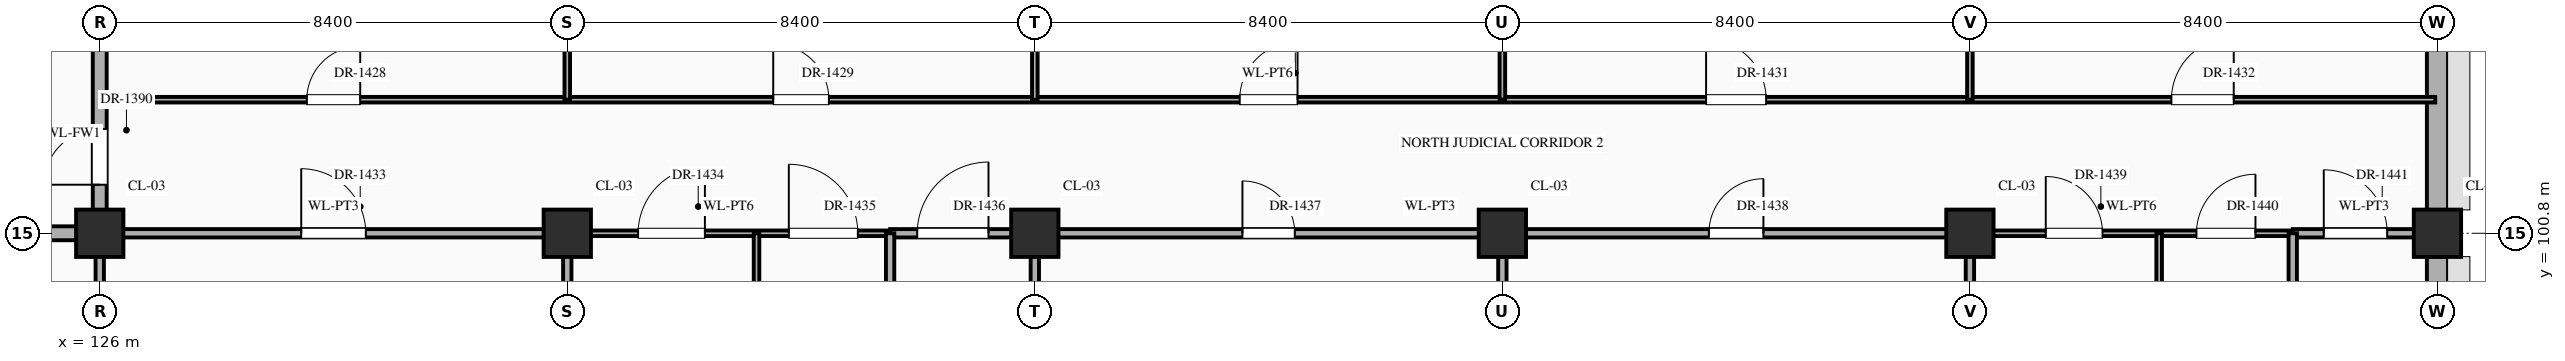
"""IFC4 building model, lengths in metres.
Left out: names, types, materials, properties, quantities, classifications, styles, units other than length and angle.
Written with IfcOpenShell. Run it as: python <this file> out.ifc"""

import sys

from ifc_helpers import new_model, si_unit, direction, frame, frame_2d, origin, origin_2d, place, context, subcontext, project, spatial, rectangle, extrude, element, fill, save


model = new_model("IFC4")
c1 = context("Model", 3, precision=1e-05, world=origin(), true_north=direction((0.0, 1.0)))
c2 = subcontext(c1, "Body", "Model", "MODEL_VIEW")
j1 = project(units=[si_unit("LENGTHUNIT", "METRE"), si_unit("PLANEANGLEUNIT", "RADIAN")], contexts=[c1])
p1 = place(None, origin())
s1 = spatial("IfcSite", under=j1, at=p1, CompositionType="ELEMENT")
p2 = place(p1, origin())
s2 = spatial("IfcBuilding", under=s1, at=p2, CompositionType="ELEMENT")
p3 = place(p2, frame((0.0, 0.0, 10.8)))
s3 = spatial("IfcBuildingStorey", under=s2, at=p3, CompositionType="ELEMENT", Elevation=10.8)
for number, where, z_axis, x_axis in (
    (1, (126.0, 100.8, 0.0), (0.0, 0.0, 1.0), (1.0, 0.0, 0.0)),
    (2, (134.4, 100.8, 0.0), (0.0, 0.0, 1.0), (1.0, 0.0, 0.0)),
    (3, (142.8, 100.8, 0.0), (0.0, 0.0, 1.0), (1.0, 0.0, 0.0)),
    (4, (151.2, 100.8, 0.0), (0.0, 0.0, 1.0), (1.0, 0.0, 0.0)),
    (5, (159.6, 100.8, 0.0), (0.0, 0.0, 1.0), (1.0, 0.0, 0.0)),
    (6, (168.0, 100.8, 0.0), (0.0, 0.0, 1.0), (1.0, 0.0, 0.0)),
):
    element("IfcColumn", number, at=place(p3, frame(where, z_axis=z_axis, x_axis=x_axis)), inside=s3, PredefinedType="COLUMN", context=c2, shape_type="SweptSolid", body=[
        extrude(rectangle(XDim=0.85, YDim=0.85, at=origin_2d()), origin(), (0.0, 0.0, 1.0), 5.4),
    ])
p4 = place(p3, frame((168.0, 94.02, 0.0), z_axis=(0.0, 0.0, 1.0), x_axis=(0.0, 1.0, 0.0)))
e7 = element("IfcWall", 7, at=p4, inside=s3, PredefinedType="STANDARD", context=c2, shape_type="SweptSolid", body=[
    extrude(rectangle(XDim=6.36, YDim=0.38, at=frame_2d((3.18, 0.0))), origin(), (0.0, 0.0, 1.0), 4.47),
])
p5 = place(p4, frame((3.805, 0.0, 0.85)))
e8 = element("IfcOpeningElement", 8, at=p5, cuts=e7, PredefinedType="OPENING", context=c2, shape_type="SweptSolid", body=[
    extrude(rectangle(XDim=1.35, YDim=1.2, at=frame_2d((0.675, 0.6))), frame((0.0, 0.202, 0.0), z_axis=(0.0, -1.0, 0.0), x_axis=(1.0, 0.0, 0.0)), (0.0, 0.0, 1.0), 0.404),
])
p6 = place(p3, frame((168.0, 101.22, 0.0), z_axis=(0.0, 0.0, 1.0), x_axis=(0.0, 1.0, 0.0)))
e9 = element("IfcWall", 9, at=p6, inside=s3, PredefinedType="STANDARD", context=c2, shape_type="SweptSolid", body=[
    extrude(rectangle(XDim=6.36, YDim=0.38, at=frame_2d((3.18, 0.0))), origin(), (0.0, 0.0, 1.0), 4.47),
])
p7 = place(p6, frame((3.805, 0.0, 0.85)))
e10 = element("IfcOpeningElement", 10, at=p7, cuts=e9, PredefinedType="OPENING", context=c2, shape_type="SweptSolid", body=[
    extrude(rectangle(XDim=1.35, YDim=1.38, at=frame_2d((0.675, 0.69))), frame((0.0, 0.202, 0.0), z_axis=(0.0, -1.0, 0.0), x_axis=(1.0, 0.0, 0.0)), (0.0, 0.0, 1.0), 0.404),
])
p8 = place(p3, frame((121.8, 100.8, 0.0), z_axis=(0.0, 0.0, 1.0), x_axis=(1.0, 0.0, 0.0)))
e11 = element("IfcWall", 11, at=p8, inside=s3, PredefinedType="STANDARD", context=c2, shape_type="SweptSolid", body=[
    extrude(rectangle(XDim=4.2, YDim=0.25, at=frame_2d((2.1, 0.0))), origin(), (0.0, 0.0, 1.0), 4.27),
])
p9 = place(p3, frame((126.0, 100.8, 0.0), z_axis=(0.0, 0.0, 1.0), x_axis=(1.0, 0.0, 0.0)))
e12 = element("IfcWall", 12, at=p9, inside=s3, PredefinedType="STANDARD", context=c2, shape_type="SweptSolid", body=[
    extrude(rectangle(XDim=8.4, YDim=0.15, at=frame_2d((4.2, 0.0))), origin(), (0.0, 0.0, 1.0), 4.27),
])
p10 = place(p9, frame((3.62, 0.0, 0.0)))
e13 = element("IfcOpeningElement", 13, at=p10, cuts=e12, PredefinedType="OPENING", context=c2, shape_type="SweptSolid", body=[
    extrude(rectangle(XDim=1.16, YDim=2.3, at=frame_2d((0.58, 1.15))), frame((0.0, 0.087, 0.0), z_axis=(0.0, -1.0, 0.0), x_axis=(1.0, 0.0, 0.0)), (0.0, 0.0, 1.0), 0.174),
])
p11 = place(p3, frame((134.4, 100.8, 0.0), z_axis=(0.0, 0.0, 1.0), x_axis=(1.0, 0.0, 0.0)))
e14 = element("IfcWall", 14, at=p11, inside=s3, PredefinedType="STANDARD", context=c2, shape_type="SweptSolid", body=[
    extrude(rectangle(XDim=5.8, YDim=0.1, at=frame_2d((2.9, 0.0))), origin(), (0.0, 0.0, 1.0), 4.27),
])
p12 = place(p11, frame((1.272, 0.0, 0.0)))
e15 = element("IfcOpeningElement", 15, at=p12, cuts=e14, PredefinedType="OPENING", context=c2, shape_type="SweptSolid", body=[
    extrude(rectangle(XDim=1.2, YDim=2.35, at=frame_2d((0.6, 1.175))), frame((0.0, 0.062, 0.0), z_axis=(0.0, -1.0, 0.0), x_axis=(1.0, 0.0, 0.0)), (0.0, 0.0, 1.0), 0.124),
])
p13 = place(p11, frame((3.98, 0.0, 0.0)))
e16 = element("IfcOpeningElement", 16, at=p13, cuts=e14, PredefinedType="OPENING", context=c2, shape_type="SweptSolid", body=[
    extrude(rectangle(XDim=1.24, YDim=2.3, at=frame_2d((0.62, 1.15))), frame((0.0, 0.062, 0.0), z_axis=(0.0, -1.0, 0.0), x_axis=(1.0, 0.0, 0.0)), (0.0, 0.0, 1.0), 0.124),
])
p14 = place(p3, frame((140.2, 100.8, 0.0), z_axis=(0.0, 0.0, 1.0), x_axis=(1.0, 0.0, 0.0)))
e17 = element("IfcWall", 17, at=p14, inside=s3, PredefinedType="STANDARD", context=c2, shape_type="SweptSolid", body=[
    extrude(rectangle(XDim=19.4, YDim=0.15, at=frame_2d((9.7, 0.0))), origin(), (0.0, 0.0, 1.0), 4.27),
])
p15 = place(p14, frame((0.488, 0.0, 0.0)))
e18 = element("IfcOpeningElement", 18, at=p15, cuts=e17, PredefinedType="OPENING", context=c2, shape_type="SweptSolid", body=[
    extrude(rectangle(XDim=1.28, YDim=2.35, at=frame_2d((0.64, 1.175))), frame((0.0, 0.087, 0.0), z_axis=(0.0, -1.0, 0.0), x_axis=(1.0, 0.0, 0.0)), (0.0, 0.0, 1.0), 0.174),
])
p16 = place(p14, frame((6.33, 0.0, 0.0)))
e19 = element("IfcOpeningElement", 19, at=p16, cuts=e17, PredefinedType="OPENING", context=c2, shape_type="SweptSolid", body=[
    extrude(rectangle(XDim=0.94, YDim=2.3, at=frame_2d((0.47, 1.15))), frame((0.0, 0.087, 0.0), z_axis=(0.0, -1.0, 0.0), x_axis=(1.0, 0.0, 0.0)), (0.0, 0.0, 1.0), 0.174),
])
p17 = place(p14, frame((14.71, 0.0, 0.0)))
e20 = element("IfcOpeningElement", 20, at=p17, cuts=e17, PredefinedType="OPENING", context=c2, shape_type="SweptSolid", body=[
    extrude(rectangle(XDim=0.98, YDim=2.35, at=frame_2d((0.49, 1.175))), frame((0.0, 0.087, 0.0), z_axis=(0.0, -1.0, 0.0), x_axis=(1.0, 0.0, 0.0)), (0.0, 0.0, 1.0), 0.174),
])
p18 = place(p3, frame((159.6, 100.8, 0.0), z_axis=(0.0, 0.0, 1.0), x_axis=(1.0, 0.0, 0.0)))
e21 = element("IfcWall", 21, at=p18, inside=s3, PredefinedType="STANDARD", context=c2, shape_type="SweptSolid", body=[
    extrude(rectangle(XDim=5.8, YDim=0.1, at=frame_2d((2.9, 0.0))), origin(), (0.0, 0.0, 1.0), 4.27),
])
p19 = place(p18, frame((1.363, 0.0, 0.0)))
e22 = element("IfcOpeningElement", 22, at=p19, cuts=e21, PredefinedType="OPENING", context=c2, shape_type="SweptSolid", body=[
    extrude(rectangle(XDim=1.02, YDim=2.4, at=frame_2d((0.51, 1.2))), frame((0.0, 0.062, 0.0), z_axis=(0.0, -1.0, 0.0), x_axis=(1.0, 0.0, 0.0)), (0.0, 0.0, 1.0), 0.124),
])
p20 = place(p18, frame((4.07, 0.0, 0.0)))
e23 = element("IfcOpeningElement", 23, at=p20, cuts=e21, PredefinedType="OPENING", context=c2, shape_type="SweptSolid", body=[
    extrude(rectangle(XDim=1.06, YDim=2.4, at=frame_2d((0.53, 1.2))), frame((0.0, 0.062, 0.0), z_axis=(0.0, -1.0, 0.0), x_axis=(1.0, 0.0, 0.0)), (0.0, 0.0, 1.0), 0.124),
])
p21 = place(p3, frame((165.4, 100.8, 0.0), z_axis=(0.0, 0.0, 1.0), x_axis=(1.0, 0.0, 0.0)))
e24 = element("IfcWall", 24, at=p21, inside=s3, PredefinedType="STANDARD", context=c2, shape_type="SweptSolid", body=[
    extrude(rectangle(XDim=2.56, YDim=0.15, at=frame_2d((1.28, 0.0))), origin(), (0.0, 0.0, 1.0), 4.27),
])
p22 = place(p21, frame((0.558, 0.0, 0.0)))
e25 = element("IfcOpeningElement", 25, at=p22, cuts=e24, PredefinedType="OPENING", context=c2, shape_type="SweptSolid", body=[
    extrude(rectangle(XDim=1.14, YDim=2.4, at=frame_2d((0.57, 1.2))), frame((0.0, 0.087, 0.0), z_axis=(0.0, -1.0, 0.0), x_axis=(1.0, 0.0, 0.0)), (0.0, 0.0, 1.0), 0.174),
])
p23 = place(p3, frame((126.0, 103.2, 0.0), z_axis=(0.0, 0.0, 1.0), x_axis=(1.0, 0.0, 0.0)))
e26 = element("IfcWall", 26, at=p23, inside=s3, PredefinedType="STANDARD", context=c2, shape_type="SweptSolid", body=[
    extrude(rectangle(XDim=41.96, YDim=0.1, at=frame_2d((20.98, 0.0))), origin(), (0.0, 0.0, 1.0), 5.12),
])
p24 = place(p23, frame((3.72, 0.0, 0.0)))
e27 = element("IfcOpeningElement", 27, at=p24, cuts=e26, PredefinedType="OPENING", context=c2, shape_type="SweptSolid", body=[
    extrude(rectangle(XDim=0.96, YDim=2.2, at=frame_2d((0.48, 1.1))), frame((0.0, 0.062, 0.0), z_axis=(0.0, -1.0, 0.0), x_axis=(1.0, 0.0, 0.0)), (0.0, 0.0, 1.0), 0.124),
])
p25 = place(p23, frame((12.1, 0.0, 0.0)))
e28 = element("IfcOpeningElement", 28, at=p25, cuts=e26, PredefinedType="OPENING", context=c2, shape_type="SweptSolid", body=[
    extrude(rectangle(XDim=1.0, YDim=2.25, at=frame_2d((0.5, 1.125))), frame((0.0, 0.062, 0.0), z_axis=(0.0, -1.0, 0.0), x_axis=(1.0, 0.0, 0.0)), (0.0, 0.0, 1.0), 0.124),
])
p26 = place(p23, frame((20.48, 0.0, 0.0)))
e29 = element("IfcOpeningElement", 29, at=p26, cuts=e26, PredefinedType="OPENING", context=c2, shape_type="SweptSolid", body=[
    extrude(rectangle(XDim=1.04, YDim=2.2, at=frame_2d((0.52, 1.1))), frame((0.0, 0.062, 0.0), z_axis=(0.0, -1.0, 0.0), x_axis=(1.0, 0.0, 0.0)), (0.0, 0.0, 1.0), 0.124),
])
p27 = place(p23, frame((28.86, 0.0, 0.0)))
e30 = element("IfcOpeningElement", 30, at=p27, cuts=e26, PredefinedType="OPENING", context=c2, shape_type="SweptSolid", body=[
    extrude(rectangle(XDim=1.08, YDim=2.25, at=frame_2d((0.54, 1.125))), frame((0.0, 0.062, 0.0), z_axis=(0.0, -1.0, 0.0), x_axis=(1.0, 0.0, 0.0)), (0.0, 0.0, 1.0), 0.124),
])
p28 = place(p23, frame((37.22, 0.0, 0.0)))
e31 = element("IfcOpeningElement", 31, at=p28, cuts=e26, PredefinedType="OPENING", context=c2, shape_type="SweptSolid", body=[
    extrude(rectangle(XDim=1.12, YDim=2.25, at=frame_2d((0.56, 1.125))), frame((0.0, 0.062, 0.0), z_axis=(0.0, -1.0, 0.0), x_axis=(1.0, 0.0, 0.0)), (0.0, 0.0, 1.0), 0.124),
])
p29 = place(p3, frame((126.0, 96.0, 0.0), z_axis=(0.0, 0.0, 1.0), x_axis=(0.0, 1.0, 0.0)))
e32 = element("IfcWall", 32, at=p29, inside=s3, PredefinedType="STANDARD", context=c2, shape_type="SweptSolid", body=[
    extrude(rectangle(XDim=4.8, YDim=0.15, at=frame_2d((2.4, 0.0))), origin(), (0.0, 0.0, 1.0), 4.37),
])
p30 = place(p3, frame((126.0, 100.8, 0.0), z_axis=(0.0, 0.0, 1.0), x_axis=(0.0, 1.0, 0.0)))
e33 = element("IfcWall", 33, at=p30, inside=s3, PredefinedType="STANDARD", context=c2, shape_type="SweptSolid", body=[
    extrude(rectangle(XDim=3.6, YDim=0.25, at=frame_2d((1.8, 0.0))), origin(), (0.0, 0.0, 1.0), 4.37),
])
p31 = place(p30, frame((0.873, 0.0, 0.0)))
e34 = element("IfcOpeningElement", 34, at=p31, cuts=e33, PredefinedType="OPENING", context=c2, shape_type="SweptSolid", body=[
    extrude(rectangle(XDim=1.0, YDim=2.2, at=frame_2d((0.5, 1.1))), frame((0.0, 0.137, 0.0), z_axis=(0.0, -1.0, 0.0), x_axis=(1.0, 0.0, 0.0)), (0.0, 0.0, 1.0), 0.274),
])
p32 = place(p3, frame((134.4, 96.0, 0.0), z_axis=(0.0, 0.0, 1.0), x_axis=(0.0, 1.0, 0.0)))
e35 = element("IfcWall", 35, at=p32, inside=s3, PredefinedType="STANDARD", context=c2, shape_type="SweptSolid", body=[
    extrude(rectangle(XDim=4.8, YDim=0.15, at=frame_2d((2.4, 0.0))), origin(), (0.0, 0.0, 1.0), 4.37),
])
p33 = place(p3, frame((134.4, 103.2, 0.0), z_axis=(0.0, 0.0, 1.0), x_axis=(0.0, 1.0, 0.0)))
e36 = element("IfcWall", 36, at=p33, inside=s3, PredefinedType="STANDARD", context=c2, shape_type="SweptSolid", body=[
    extrude(rectangle(XDim=4.76, YDim=0.1, at=frame_2d((2.38, 0.0))), origin(), (0.0, 0.0, 1.0), 4.37),
])
p34 = place(p3, frame((137.8, 96.0, 0.0), z_axis=(0.0, 0.0, 1.0), x_axis=(0.0, 1.0, 0.0)))
e37 = element("IfcWall", 37, at=p34, inside=s3, PredefinedType="STANDARD", context=c2, shape_type="SweptSolid", body=[
    extrude(rectangle(XDim=4.8, YDim=0.1, at=frame_2d((2.4, 0.0))), origin(), (0.0, 0.0, 1.0), 5.12),
])
p35 = place(p34, frame((1.8, 0.0, 0.0)))
e38 = element("IfcOpeningElement", 38, at=p35, cuts=e37, PredefinedType="OPENING", context=c2, shape_type="SweptSolid", body=[
    extrude(rectangle(XDim=1.2, YDim=2.35, at=frame_2d((0.6, 1.175))), frame((0.0, 0.062, 0.0), z_axis=(0.0, -1.0, 0.0), x_axis=(1.0, 0.0, 0.0)), (0.0, 0.0, 1.0), 0.124),
])
p36 = place(p3, frame((140.2, 96.0, 0.0), z_axis=(0.0, 0.0, 1.0), x_axis=(0.0, 1.0, 0.0)))
e39 = element("IfcWall", 39, at=p36, inside=s3, PredefinedType="STANDARD", context=c2, shape_type="SweptSolid", body=[
    extrude(rectangle(XDim=4.8, YDim=0.15, at=frame_2d((2.4, 0.0))), origin(), (0.0, 0.0, 1.0), 5.12),
])
p37 = place(p36, frame((1.78, 0.0, 0.0)))
e40 = element("IfcOpeningElement", 40, at=p37, cuts=e39, PredefinedType="OPENING", context=c2, shape_type="SweptSolid", body=[
    extrude(rectangle(XDim=1.24, YDim=2.3, at=frame_2d((0.62, 1.15))), frame((0.0, 0.087, 0.0), z_axis=(0.0, -1.0, 0.0), x_axis=(1.0, 0.0, 0.0)), (0.0, 0.0, 1.0), 0.174),
])
p38 = place(p3, frame((142.8, 96.0, 0.0), z_axis=(0.0, 0.0, 1.0), x_axis=(0.0, 1.0, 0.0)))
e41 = element("IfcWall", 41, at=p38, inside=s3, PredefinedType="STANDARD", context=c2, shape_type="SweptSolid", body=[
    extrude(rectangle(XDim=4.8, YDim=0.15, at=frame_2d((2.4, 0.0))), origin(), (0.0, 0.0, 1.0), 4.37),
])
p39 = place(p3, frame((142.8, 103.2, 0.0), z_axis=(0.0, 0.0, 1.0), x_axis=(0.0, 1.0, 0.0)))
e42 = element("IfcWall", 42, at=p39, inside=s3, PredefinedType="STANDARD", context=c2, shape_type="SweptSolid", body=[
    extrude(rectangle(XDim=4.76, YDim=0.1, at=frame_2d((2.38, 0.0))), origin(), (0.0, 0.0, 1.0), 4.37),
])
p40 = place(p3, frame((151.2, 96.0, 0.0), z_axis=(0.0, 0.0, 1.0), x_axis=(0.0, 1.0, 0.0)))
e43 = element("IfcWall", 43, at=p40, inside=s3, PredefinedType="STANDARD", context=c2, shape_type="SweptSolid", body=[
    extrude(rectangle(XDim=4.8, YDim=0.15, at=frame_2d((2.4, 0.0))), origin(), (0.0, 0.0, 1.0), 4.37),
])
p41 = place(p3, frame((151.2, 103.2, 0.0), z_axis=(0.0, 0.0, 1.0), x_axis=(0.0, 1.0, 0.0)))
e44 = element("IfcWall", 44, at=p41, inside=s3, PredefinedType="STANDARD", context=c2, shape_type="SweptSolid", body=[
    extrude(rectangle(XDim=4.76, YDim=0.1, at=frame_2d((2.38, 0.0))), origin(), (0.0, 0.0, 1.0), 4.37),
])
p42 = place(p3, frame((159.6, 96.0, 0.0), z_axis=(0.0, 0.0, 1.0), x_axis=(0.0, 1.0, 0.0)))
e45 = element("IfcWall", 45, at=p42, inside=s3, PredefinedType="STANDARD", context=c2, shape_type="SweptSolid", body=[
    extrude(rectangle(XDim=4.8, YDim=0.15, at=frame_2d((2.4, 0.0))), origin(), (0.0, 0.0, 1.0), 4.37),
])
p43 = place(p3, frame((159.6, 103.2, 0.0), z_axis=(0.0, 0.0, 1.0), x_axis=(0.0, 1.0, 0.0)))
e46 = element("IfcWall", 46, at=p43, inside=s3, PredefinedType="STANDARD", context=c2, shape_type="SweptSolid", body=[
    extrude(rectangle(XDim=4.76, YDim=0.1, at=frame_2d((2.38, 0.0))), origin(), (0.0, 0.0, 1.0), 4.37),
])
p44 = place(p3, frame((163.0, 96.0, 0.0), z_axis=(0.0, 0.0, 1.0), x_axis=(0.0, 1.0, 0.0)))
e47 = element("IfcWall", 47, at=p44, inside=s3, PredefinedType="STANDARD", context=c2, shape_type="SweptSolid", body=[
    extrude(rectangle(XDim=4.8, YDim=0.1, at=frame_2d((2.4, 0.0))), origin(), (0.0, 0.0, 1.0), 5.12),
])
p45 = place(p44, frame((1.76, 0.0, 0.0)))
e48 = element("IfcOpeningElement", 48, at=p45, cuts=e47, PredefinedType="OPENING", context=c2, shape_type="SweptSolid", body=[
    extrude(rectangle(XDim=1.28, YDim=2.35, at=frame_2d((0.64, 1.175))), frame((0.0, 0.062, 0.0), z_axis=(0.0, -1.0, 0.0), x_axis=(1.0, 0.0, 0.0)), (0.0, 0.0, 1.0), 0.124),
])
p46 = place(p3, frame((165.4, 96.0, 0.0), z_axis=(0.0, 0.0, 1.0), x_axis=(0.0, 1.0, 0.0)))
e49 = element("IfcWall", 49, at=p46, inside=s3, PredefinedType="STANDARD", context=c2, shape_type="SweptSolid", body=[
    extrude(rectangle(XDim=4.8, YDim=0.15, at=frame_2d((2.4, 0.0))), origin(), (0.0, 0.0, 1.0), 5.12),
])
p47 = place(p46, frame((1.93, 0.0, 0.0)))
e50 = element("IfcOpeningElement", 50, at=p47, cuts=e49, PredefinedType="OPENING", context=c2, shape_type="SweptSolid", body=[
    extrude(rectangle(XDim=0.94, YDim=2.3, at=frame_2d((0.47, 1.15))), frame((0.0, 0.087, 0.0), z_axis=(0.0, -1.0, 0.0), x_axis=(1.0, 0.0, 0.0)), (0.0, 0.0, 1.0), 0.174),
])
p48 = place(p31, origin())
e51 = element("IfcDoor", 51, at=p48, inside=s3, OperationType="SINGLE_SWING_LEFT", PredefinedType="DOOR", context=c2, shape_type="SweptSolid", body=[
    extrude(rectangle(XDim=1.0, YDim=2.2, at=frame_2d((0.5, 1.1))), frame((0.0, 0.025, 0.0), z_axis=(0.0, -1.0, 0.0), x_axis=(1.0, 0.0, 0.0)), (0.0, 0.0, 1.0), 0.05),
])
fill(e34, e51)
p49 = place(p24, origin())
e52 = element("IfcDoor", 52, at=p49, inside=s3, OperationType="SINGLE_SWING_RIGHT", PredefinedType="DOOR", context=c2, shape_type="SweptSolid", body=[
    extrude(rectangle(XDim=0.96, YDim=2.2, at=frame_2d((0.48, 1.1))), frame((0.0, 0.025, 0.0), z_axis=(0.0, -1.0, 0.0), x_axis=(1.0, 0.0, 0.0)), (0.0, 0.0, 1.0), 0.05),
])
fill(e27, e52)
p50 = place(p25, origin())
e53 = element("IfcDoor", 53, at=p50, inside=s3, OperationType="SINGLE_SWING_LEFT", PredefinedType="DOOR", context=c2, shape_type="SweptSolid", body=[
    extrude(rectangle(XDim=1.0, YDim=2.25, at=frame_2d((0.5, 1.125))), frame((0.0, 0.025, 0.0), z_axis=(0.0, -1.0, 0.0), x_axis=(1.0, 0.0, 0.0)), (0.0, 0.0, 1.0), 0.05),
])
fill(e28, e53)
p51 = place(p26, origin())
e54 = element("IfcDoor", 54, at=p51, inside=s3, OperationType="SINGLE_SWING_RIGHT", PredefinedType="DOOR", context=c2, shape_type="SweptSolid", body=[
    extrude(rectangle(XDim=1.04, YDim=2.2, at=frame_2d((0.52, 1.1))), frame((0.0, 0.025, 0.0), z_axis=(0.0, -1.0, 0.0), x_axis=(1.0, 0.0, 0.0)), (0.0, 0.0, 1.0), 0.05),
])
fill(e29, e54)
p52 = place(p27, origin())
e55 = element("IfcDoor", 55, at=p52, inside=s3, OperationType="SINGLE_SWING_LEFT", PredefinedType="DOOR", context=c2, shape_type="SweptSolid", body=[
    extrude(rectangle(XDim=1.08, YDim=2.25, at=frame_2d((0.54, 1.125))), frame((0.0, 0.025, 0.0), z_axis=(0.0, -1.0, 0.0), x_axis=(1.0, 0.0, 0.0)), (0.0, 0.0, 1.0), 0.05),
])
fill(e30, e55)
p53 = place(p28, origin())
e56 = element("IfcDoor", 56, at=p53, inside=s3, OperationType="SINGLE_SWING_RIGHT", PredefinedType="DOOR", context=c2, shape_type="SweptSolid", body=[
    extrude(rectangle(XDim=1.12, YDim=2.25, at=frame_2d((0.56, 1.125))), frame((0.0, 0.025, 0.0), z_axis=(0.0, -1.0, 0.0), x_axis=(1.0, 0.0, 0.0)), (0.0, 0.0, 1.0), 0.05),
])
fill(e31, e56)
p54 = place(p10, origin())
e57 = element("IfcDoor", 57, at=p54, inside=s3, OperationType="SINGLE_SWING_LEFT", PredefinedType="DOOR", context=c2, shape_type="SweptSolid", body=[
    extrude(rectangle(XDim=1.16, YDim=2.3, at=frame_2d((0.58, 1.15))), frame((0.0, 0.025, 0.0), z_axis=(0.0, -1.0, 0.0), x_axis=(1.0, 0.0, 0.0)), (0.0, 0.0, 1.0), 0.05),
])
fill(e13, e57)
p55 = place(p12, origin())
e58 = element("IfcDoor", 58, at=p55, inside=s3, OperationType="SINGLE_SWING_RIGHT", PredefinedType="DOOR", context=c2, shape_type="SweptSolid", body=[
    extrude(rectangle(XDim=1.2, YDim=2.35, at=frame_2d((0.6, 1.175))), frame((0.0, 0.025, 0.0), z_axis=(0.0, -1.0, 0.0), x_axis=(1.0, 0.0, 0.0)), (0.0, 0.0, 1.0), 0.05),
])
fill(e15, e58)
p56 = place(p13, origin())
e59 = element("IfcDoor", 59, at=p56, inside=s3, OperationType="SINGLE_SWING_LEFT", PredefinedType="DOOR", context=c2, shape_type="SweptSolid", body=[
    extrude(rectangle(XDim=1.24, YDim=2.3, at=frame_2d((0.62, 1.15))), frame((0.0, 0.025, 0.0), z_axis=(0.0, -1.0, 0.0), x_axis=(1.0, 0.0, 0.0)), (0.0, 0.0, 1.0), 0.05),
])
fill(e16, e59)
p57 = place(p15, origin())
e60 = element("IfcDoor", 60, at=p57, inside=s3, OperationType="SINGLE_SWING_RIGHT", PredefinedType="DOOR", context=c2, shape_type="SweptSolid", body=[
    extrude(rectangle(XDim=1.28, YDim=2.35, at=frame_2d((0.64, 1.175))), frame((0.0, 0.025, 0.0), z_axis=(0.0, -1.0, 0.0), x_axis=(1.0, 0.0, 0.0)), (0.0, 0.0, 1.0), 0.05),
])
fill(e18, e60)
p58 = place(p16, origin())
e61 = element("IfcDoor", 61, at=p58, inside=s3, OperationType="SINGLE_SWING_LEFT", PredefinedType="DOOR", context=c2, shape_type="SweptSolid", body=[
    extrude(rectangle(XDim=0.94, YDim=2.3, at=frame_2d((0.47, 1.15))), frame((0.0, 0.025, 0.0), z_axis=(0.0, -1.0, 0.0), x_axis=(1.0, 0.0, 0.0)), (0.0, 0.0, 1.0), 0.05),
])
fill(e19, e61)
p59 = place(p17, origin())
e62 = element("IfcDoor", 62, at=p59, inside=s3, OperationType="SINGLE_SWING_RIGHT", PredefinedType="DOOR", context=c2, shape_type="SweptSolid", body=[
    extrude(rectangle(XDim=0.98, YDim=2.35, at=frame_2d((0.49, 1.175))), frame((0.0, 0.025, 0.0), z_axis=(0.0, -1.0, 0.0), x_axis=(1.0, 0.0, 0.0)), (0.0, 0.0, 1.0), 0.05),
])
fill(e20, e62)
p60 = place(p19, origin())
e63 = element("IfcDoor", 63, at=p60, inside=s3, OperationType="SINGLE_SWING_LEFT", PredefinedType="DOOR", context=c2, shape_type="SweptSolid", body=[
    extrude(rectangle(XDim=1.02, YDim=2.4, at=frame_2d((0.51, 1.2))), frame((0.0, 0.025, 0.0), z_axis=(0.0, -1.0, 0.0), x_axis=(1.0, 0.0, 0.0)), (0.0, 0.0, 1.0), 0.05),
])
fill(e22, e63)
p61 = place(p20, origin())
e64 = element("IfcDoor", 64, at=p61, inside=s3, OperationType="SINGLE_SWING_RIGHT", PredefinedType="DOOR", context=c2, shape_type="SweptSolid", body=[
    extrude(rectangle(XDim=1.06, YDim=2.4, at=frame_2d((0.53, 1.2))), frame((0.0, 0.025, 0.0), z_axis=(0.0, -1.0, 0.0), x_axis=(1.0, 0.0, 0.0)), (0.0, 0.0, 1.0), 0.05),
])
fill(e23, e64)
p62 = place(p22, origin())
e65 = element("IfcDoor", 65, at=p62, inside=s3, OperationType="SINGLE_SWING_LEFT", PredefinedType="DOOR", context=c2, shape_type="SweptSolid", body=[
    extrude(rectangle(XDim=1.14, YDim=2.4, at=frame_2d((0.57, 1.2))), frame((0.0, 0.025, 0.0), z_axis=(0.0, -1.0, 0.0), x_axis=(1.0, 0.0, 0.0)), (0.0, 0.0, 1.0), 0.05),
])
fill(e25, e65)
save(model, sys.argv[1])
